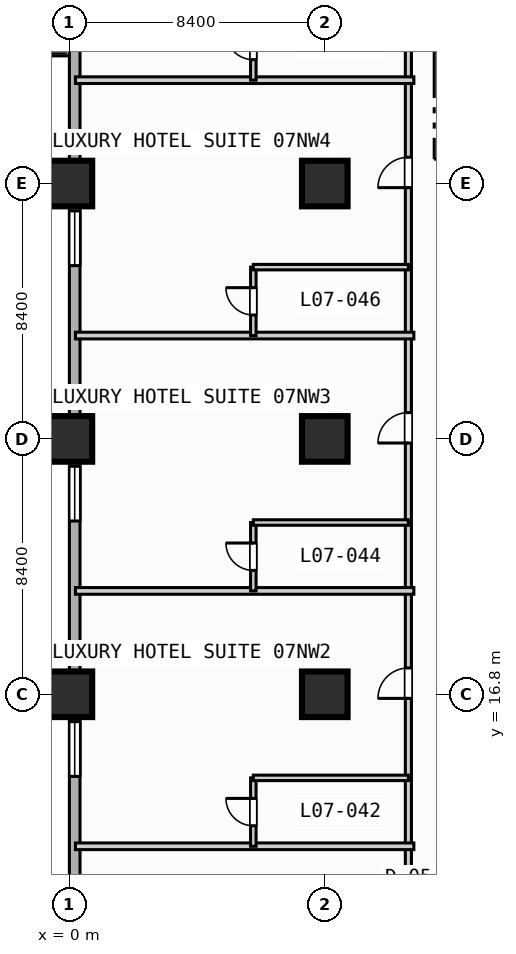
"""IFC4 building model, lengths in metres.
Left out: names, types, materials, properties, quantities, classifications, styles, units other than length and angle.
Written with IfcOpenShell. Run it as: python <this file> out.ifc"""

import sys

from ifc_helpers import new_model, si_unit, direction, frame, frame_2d, origin, origin_2d, place, context, subcontext, project, spatial, rectangle, extrude, element, fill, save


model = new_model("IFC4")
c1 = context("Model", 3, precision=1e-05, world=origin(), true_north=direction((0.0, 1.0)))
c2 = subcontext(c1, "Body", "Model", "MODEL_VIEW")
j1 = project(units=[si_unit("LENGTHUNIT", "METRE"), si_unit("PLANEANGLEUNIT", "RADIAN")], contexts=[c1])
p1 = place(None, origin())
s1 = spatial("IfcSite", under=j1, at=p1, CompositionType="ELEMENT")
p2 = place(p1, origin())
s2 = spatial("IfcBuilding", under=s1, at=p2, CompositionType="ELEMENT")
p3 = place(p2, frame((0.0, 0.0, 35.8)))
s3 = spatial("IfcBuildingStorey", under=s2, at=p3, CompositionType="ELEMENT", Elevation=35.8)
for number, where, z_axis, x_axis in (
    (1, (0.0, 16.8, 0.0), (0.0, 0.0, 1.0), (1.0, 0.0, 0.0)),
    (2, (0.0, 25.2, 0.0), (0.0, 0.0, 1.0), (1.0, 0.0, 0.0)),
    (3, (0.0, 33.6, 0.0), (0.0, 0.0, 1.0), (1.0, 0.0, 0.0)),
    (4, (8.4, 16.8, 0.0), (0.0, 0.0, 1.0), (1.0, 0.0, 0.0)),
    (5, (8.4, 25.2, 0.0), (0.0, 0.0, 1.0), (1.0, 0.0, 0.0)),
    (6, (8.4, 33.6, 0.0), (0.0, 0.0, 1.0), (1.0, 0.0, 0.0)),
):
    element("IfcColumn", number, at=place(p3, frame(where, z_axis=z_axis, x_axis=x_axis)), inside=s3, PredefinedType="COLUMN", context=c2, shape_type="SweptSolid", body=[
        extrude(rectangle(XDim=1.5, YDim=1.5, at=origin_2d()), origin(), (0.0, 0.0, 1.0), 3.8),
    ])
p4 = place(p3, frame((0.175, 3.175, 0.0), z_axis=(0.0, 0.0, 1.0), x_axis=(0.0, 1.0, 0.0)))
e7 = element("IfcWall", 7, at=p4, inside=s3, PredefinedType="STANDARD", context=c2, shape_type="SweptSolid", body=[
    extrude(rectangle(XDim=86.05, YDim=0.35, at=frame_2d((43.025, 0.0))), origin(), (0.0, 0.0, 1.0), 3.55),
])
p5 = place(p4, frame((42.825, 0.0, 0.0)))
e8 = element("IfcOpeningElement", 8, at=p5, cuts=e7, PredefinedType="OPENING", context=c2, shape_type="SweptSolid", body=[
    extrude(rectangle(XDim=1.4, YDim=2.2, at=frame_2d((0.7, 1.1))), frame((0.0, 0.185, 0.0), z_axis=(0.0, -1.0, 0.0), x_axis=(1.0, 0.0, 0.0)), (0.0, 0.0, 1.0), 0.37),
])
p6 = place(p4, frame((2.525, 0.0, 0.85)))
e9 = element("IfcOpeningElement", 9, at=p6, cuts=e7, PredefinedType="OPENING", context=c2, shape_type="SweptSolid", body=[
    extrude(rectangle(XDim=1.8, YDim=1.8, at=frame_2d((0.9, 0.9))), frame((0.0, 0.185, 0.0), z_axis=(0.0, -1.0, 0.0), x_axis=(1.0, 0.0, 0.0)), (0.0, 0.0, 1.0), 0.37),
])
p7 = place(p4, frame((10.925, 0.0, 0.85)))
e10 = element("IfcOpeningElement", 10, at=p7, cuts=e7, PredefinedType="OPENING", context=c2, shape_type="SweptSolid", body=[
    extrude(rectangle(XDim=1.8, YDim=1.8, at=frame_2d((0.9, 0.9))), frame((0.0, 0.185, 0.0), z_axis=(0.0, -1.0, 0.0), x_axis=(1.0, 0.0, 0.0)), (0.0, 0.0, 1.0), 0.37),
])
p8 = place(p4, frame((19.325, 0.0, 0.85)))
e11 = element("IfcOpeningElement", 11, at=p8, cuts=e7, PredefinedType="OPENING", context=c2, shape_type="SweptSolid", body=[
    extrude(rectangle(XDim=1.8, YDim=1.8, at=frame_2d((0.9, 0.9))), frame((0.0, 0.185, 0.0), z_axis=(0.0, -1.0, 0.0), x_axis=(1.0, 0.0, 0.0)), (0.0, 0.0, 1.0), 0.37),
])
p9 = place(p4, frame((27.725, 0.0, 0.85)))
e12 = element("IfcOpeningElement", 12, at=p9, cuts=e7, PredefinedType="OPENING", context=c2, shape_type="SweptSolid", body=[
    extrude(rectangle(XDim=1.8, YDim=1.8, at=frame_2d((0.9, 0.9))), frame((0.0, 0.185, 0.0), z_axis=(0.0, -1.0, 0.0), x_axis=(1.0, 0.0, 0.0)), (0.0, 0.0, 1.0), 0.37),
])
p10 = place(p4, frame((36.125, 0.0, 0.85)))
e13 = element("IfcOpeningElement", 13, at=p10, cuts=e7, PredefinedType="OPENING", context=c2, shape_type="SweptSolid", body=[
    extrude(rectangle(XDim=1.8, YDim=1.8, at=frame_2d((0.9, 0.9))), frame((0.0, 0.185, 0.0), z_axis=(0.0, -1.0, 0.0), x_axis=(1.0, 0.0, 0.0)), (0.0, 0.0, 1.0), 0.37),
])
p11 = place(p4, frame((52.925, 0.0, 0.85)))
e14 = element("IfcOpeningElement", 14, at=p11, cuts=e7, PredefinedType="OPENING", context=c2, shape_type="SweptSolid", body=[
    extrude(rectangle(XDim=1.8, YDim=1.8, at=frame_2d((0.9, 0.9))), frame((0.0, 0.185, 0.0), z_axis=(0.0, -1.0, 0.0), x_axis=(1.0, 0.0, 0.0)), (0.0, 0.0, 1.0), 0.37),
])
p12 = place(p4, frame((61.325, 0.0, 0.85)))
e15 = element("IfcOpeningElement", 15, at=p12, cuts=e7, PredefinedType="OPENING", context=c2, shape_type="SweptSolid", body=[
    extrude(rectangle(XDim=1.8, YDim=1.8, at=frame_2d((0.9, 0.9))), frame((0.0, 0.185, 0.0), z_axis=(0.0, -1.0, 0.0), x_axis=(1.0, 0.0, 0.0)), (0.0, 0.0, 1.0), 0.37),
])
p13 = place(p4, frame((69.725, 0.0, 0.85)))
e16 = element("IfcOpeningElement", 16, at=p13, cuts=e7, PredefinedType="OPENING", context=c2, shape_type="SweptSolid", body=[
    extrude(rectangle(XDim=1.8, YDim=1.8, at=frame_2d((0.9, 0.9))), frame((0.0, 0.185, 0.0), z_axis=(0.0, -1.0, 0.0), x_axis=(1.0, 0.0, 0.0)), (0.0, 0.0, 1.0), 0.37),
])
p14 = place(p4, frame((78.075, 0.0, 0.85)))
e17 = element("IfcOpeningElement", 17, at=p14, cuts=e7, PredefinedType="OPENING", context=c2, shape_type="SweptSolid", body=[
    extrude(rectangle(XDim=1.8, YDim=1.8, at=frame_2d((0.9, 0.9))), frame((0.0, 0.185, 0.0), z_axis=(0.0, -1.0, 0.0), x_axis=(1.0, 0.0, 0.0)), (0.0, 0.0, 1.0), 0.37),
])
p15 = place(p3, frame((11.15, 3.4, 0.0), z_axis=(0.0, 0.0, 1.0), x_axis=(0.0, 1.0, 0.0)))
e18 = element("IfcWall", 18, at=p15, inside=s3, PredefinedType="PARTITIONING", context=c2, shape_type="SweptSolid", body=[
    extrude(rectangle(XDim=85.4, YDim=0.2, at=frame_2d((42.7, 0.0))), origin(), (0.0, 0.0, 1.0), 3.55),
])
p16 = place(p15, frame((4.865, 0.0, 0.0)))
e19 = element("IfcOpeningElement", 19, at=p16, cuts=e18, PredefinedType="OPENING", context=c2, shape_type="SweptSolid", body=[
    extrude(rectangle(XDim=1.0, YDim=2.15, at=frame_2d((0.5, 1.075))), frame((0.0, 0.11, 0.0), z_axis=(0.0, -1.0, 0.0), x_axis=(1.0, 0.0, 0.0)), (0.0, 0.0, 1.0), 0.22),
])
p17 = place(p15, frame((13.265, 0.0, 0.0)))
e20 = element("IfcOpeningElement", 20, at=p17, cuts=e18, PredefinedType="OPENING", context=c2, shape_type="SweptSolid", body=[
    extrude(rectangle(XDim=1.0, YDim=2.15, at=frame_2d((0.5, 1.075))), frame((0.0, 0.11, 0.0), z_axis=(0.0, -1.0, 0.0), x_axis=(1.0, 0.0, 0.0)), (0.0, 0.0, 1.0), 0.22),
])
p18 = place(p15, frame((21.665, 0.0, 0.0)))
e21 = element("IfcOpeningElement", 21, at=p18, cuts=e18, PredefinedType="OPENING", context=c2, shape_type="SweptSolid", body=[
    extrude(rectangle(XDim=1.0, YDim=2.15, at=frame_2d((0.5, 1.075))), frame((0.0, 0.11, 0.0), z_axis=(0.0, -1.0, 0.0), x_axis=(1.0, 0.0, 0.0)), (0.0, 0.0, 1.0), 0.22),
])
p19 = place(p15, frame((30.065, 0.0, 0.0)))
e22 = element("IfcOpeningElement", 22, at=p19, cuts=e18, PredefinedType="OPENING", context=c2, shape_type="SweptSolid", body=[
    extrude(rectangle(XDim=1.0, YDim=2.15, at=frame_2d((0.5, 1.075))), frame((0.0, 0.11, 0.0), z_axis=(0.0, -1.0, 0.0), x_axis=(1.0, 0.0, 0.0)), (0.0, 0.0, 1.0), 0.22),
])
p20 = place(p15, frame((38.465, 0.0, 0.0)))
e23 = element("IfcOpeningElement", 23, at=p20, cuts=e18, PredefinedType="OPENING", context=c2, shape_type="SweptSolid", body=[
    extrude(rectangle(XDim=1.0, YDim=2.15, at=frame_2d((0.5, 1.075))), frame((0.0, 0.11, 0.0), z_axis=(0.0, -1.0, 0.0), x_axis=(1.0, 0.0, 0.0)), (0.0, 0.0, 1.0), 0.22),
])
p21 = place(p15, frame((46.865, 0.0, 0.0)))
e24 = element("IfcOpeningElement", 24, at=p21, cuts=e18, PredefinedType="OPENING", context=c2, shape_type="SweptSolid", body=[
    extrude(rectangle(XDim=1.0, YDim=2.15, at=frame_2d((0.5, 1.075))), frame((0.0, 0.11, 0.0), z_axis=(0.0, -1.0, 0.0), x_axis=(1.0, 0.0, 0.0)), (0.0, 0.0, 1.0), 0.22),
])
p22 = place(p15, frame((55.265, 0.0, 0.0)))
e25 = element("IfcOpeningElement", 25, at=p22, cuts=e18, PredefinedType="OPENING", context=c2, shape_type="SweptSolid", body=[
    extrude(rectangle(XDim=1.0, YDim=2.15, at=frame_2d((0.5, 1.075))), frame((0.0, 0.11, 0.0), z_axis=(0.0, -1.0, 0.0), x_axis=(1.0, 0.0, 0.0)), (0.0, 0.0, 1.0), 0.22),
])
p23 = place(p15, frame((63.665, 0.0, 0.0)))
e26 = element("IfcOpeningElement", 26, at=p23, cuts=e18, PredefinedType="OPENING", context=c2, shape_type="SweptSolid", body=[
    extrude(rectangle(XDim=1.0, YDim=2.15, at=frame_2d((0.5, 1.075))), frame((0.0, 0.11, 0.0), z_axis=(0.0, -1.0, 0.0), x_axis=(1.0, 0.0, 0.0)), (0.0, 0.0, 1.0), 0.22),
])
p24 = place(p15, frame((72.065, 0.0, 0.0)))
e27 = element("IfcOpeningElement", 27, at=p24, cuts=e18, PredefinedType="OPENING", context=c2, shape_type="SweptSolid", body=[
    extrude(rectangle(XDim=1.0, YDim=2.15, at=frame_2d((0.5, 1.075))), frame((0.0, 0.11, 0.0), z_axis=(0.0, -1.0, 0.0), x_axis=(1.0, 0.0, 0.0)), (0.0, 0.0, 1.0), 0.22),
])
p25 = place(p15, frame((81.165, 0.0, 0.0)))
e28 = element("IfcOpeningElement", 28, at=p25, cuts=e18, PredefinedType="OPENING", context=c2, shape_type="SweptSolid", body=[
    extrude(rectangle(XDim=1.0, YDim=2.15, at=frame_2d((0.5, 1.075))), frame((0.0, 0.11, 0.0), z_axis=(0.0, -1.0, 0.0), x_axis=(1.0, 0.0, 0.0)), (0.0, 0.0, 1.0), 0.22),
])
p26 = place(p3, frame((0.2, 11.8, 0.0), z_axis=(0.0, 0.0, 1.0), x_axis=(1.0, 0.0, 0.0)))
e29 = element("IfcWall", 29, at=p26, inside=s3, PredefinedType="PARTITIONING", context=c2, shape_type="SweptSolid", body=[
    extrude(rectangle(XDim=11.13, YDim=0.22, at=frame_2d((5.565, 0.0))), origin(), (0.0, 0.0, 1.0), 3.55),
])
p27 = place(p3, frame((6.05, 11.8, 0.0), z_axis=(0.0, 0.0, 1.0), x_axis=(0.0, 1.0, 0.0)))
e30 = element("IfcWall", 30, at=p27, inside=s3, PredefinedType="PLUMBINGWALL", context=c2, shape_type="SweptSolid", body=[
    extrude(rectangle(XDim=2.25, YDim=0.18, at=frame_2d((1.125, 0.0))), origin(), (0.0, 0.0, 1.0), 3.55),
])
p28 = place(p27, frame((0.675, 0.0, 0.0)))
e31 = element("IfcOpeningElement", 31, at=p28, cuts=e30, PredefinedType="OPENING", context=c2, shape_type="SweptSolid", body=[
    extrude(rectangle(XDim=0.9, YDim=2.1, at=frame_2d((0.45, 1.05))), frame((0.0, 0.1, 0.0), z_axis=(0.0, -1.0, 0.0), x_axis=(1.0, 0.0, 0.0)), (0.0, 0.0, 1.0), 0.2),
])
p29 = place(p3, frame((6.05, 14.05, 0.0), z_axis=(0.0, 0.0, 1.0), x_axis=(1.0, 0.0, 0.0)))
e32 = element("IfcWall", 32, at=p29, inside=s3, PredefinedType="PLUMBINGWALL", context=c2, shape_type="SweptSolid", body=[
    extrude(rectangle(XDim=5.1, YDim=0.18, at=frame_2d((2.55, 0.0))), origin(), (0.0, 0.0, 1.0), 3.55),
])
p30 = place(p3, frame((0.2, 20.2, 0.0), z_axis=(0.0, 0.0, 1.0), x_axis=(1.0, 0.0, 0.0)))
e33 = element("IfcWall", 33, at=p30, inside=s3, PredefinedType="PARTITIONING", context=c2, shape_type="SweptSolid", body=[
    extrude(rectangle(XDim=11.13, YDim=0.22, at=frame_2d((5.565, 0.0))), origin(), (0.0, 0.0, 1.0), 3.55),
])
p31 = place(p3, frame((6.05, 20.2, 0.0), z_axis=(0.0, 0.0, 1.0), x_axis=(0.0, 1.0, 0.0)))
e34 = element("IfcWall", 34, at=p31, inside=s3, PredefinedType="PLUMBINGWALL", context=c2, shape_type="SweptSolid", body=[
    extrude(rectangle(XDim=2.25, YDim=0.18, at=frame_2d((1.125, 0.0))), origin(), (0.0, 0.0, 1.0), 3.55),
])
p32 = place(p31, frame((0.675, 0.0, 0.0)))
e35 = element("IfcOpeningElement", 35, at=p32, cuts=e34, PredefinedType="OPENING", context=c2, shape_type="SweptSolid", body=[
    extrude(rectangle(XDim=0.9, YDim=2.1, at=frame_2d((0.45, 1.05))), frame((0.0, 0.1, 0.0), z_axis=(0.0, -1.0, 0.0), x_axis=(1.0, 0.0, 0.0)), (0.0, 0.0, 1.0), 0.2),
])
p33 = place(p3, frame((6.05, 22.45, 0.0), z_axis=(0.0, 0.0, 1.0), x_axis=(1.0, 0.0, 0.0)))
e36 = element("IfcWall", 36, at=p33, inside=s3, PredefinedType="PLUMBINGWALL", context=c2, shape_type="SweptSolid", body=[
    extrude(rectangle(XDim=5.1, YDim=0.18, at=frame_2d((2.55, 0.0))), origin(), (0.0, 0.0, 1.0), 3.55),
])
p34 = place(p3, frame((0.2, 28.6, 0.0), z_axis=(0.0, 0.0, 1.0), x_axis=(1.0, 0.0, 0.0)))
e37 = element("IfcWall", 37, at=p34, inside=s3, PredefinedType="PARTITIONING", context=c2, shape_type="SweptSolid", body=[
    extrude(rectangle(XDim=11.13, YDim=0.22, at=frame_2d((5.565, 0.0))), origin(), (0.0, 0.0, 1.0), 3.55),
])
p35 = place(p3, frame((6.05, 28.6, 0.0), z_axis=(0.0, 0.0, 1.0), x_axis=(0.0, 1.0, 0.0)))
e38 = element("IfcWall", 38, at=p35, inside=s3, PredefinedType="PLUMBINGWALL", context=c2, shape_type="SweptSolid", body=[
    extrude(rectangle(XDim=2.25, YDim=0.18, at=frame_2d((1.125, 0.0))), origin(), (0.0, 0.0, 1.0), 3.55),
])
p36 = place(p35, frame((0.675, 0.0, 0.0)))
e39 = element("IfcOpeningElement", 39, at=p36, cuts=e38, PredefinedType="OPENING", context=c2, shape_type="SweptSolid", body=[
    extrude(rectangle(XDim=0.9, YDim=2.1, at=frame_2d((0.45, 1.05))), frame((0.0, 0.1, 0.0), z_axis=(0.0, -1.0, 0.0), x_axis=(1.0, 0.0, 0.0)), (0.0, 0.0, 1.0), 0.2),
])
p37 = place(p3, frame((6.05, 30.85, 0.0), z_axis=(0.0, 0.0, 1.0), x_axis=(1.0, 0.0, 0.0)))
e40 = element("IfcWall", 40, at=p37, inside=s3, PredefinedType="PLUMBINGWALL", context=c2, shape_type="SweptSolid", body=[
    extrude(rectangle(XDim=5.1, YDim=0.18, at=frame_2d((2.55, 0.0))), origin(), (0.0, 0.0, 1.0), 3.55),
])
p38 = place(p3, frame((0.2, 37.0, 0.0), z_axis=(0.0, 0.0, 1.0), x_axis=(1.0, 0.0, 0.0)))
e41 = element("IfcWall", 41, at=p38, inside=s3, PredefinedType="PARTITIONING", context=c2, shape_type="SweptSolid", body=[
    extrude(rectangle(XDim=11.13, YDim=0.22, at=frame_2d((5.565, 0.0))), origin(), (0.0, 0.0, 1.0), 3.55),
])
p39 = place(p3, frame((6.05, 37.0, 0.0), z_axis=(0.0, 0.0, 1.0), x_axis=(0.0, 1.0, 0.0)))
e42 = element("IfcWall", 42, at=p39, inside=s3, PredefinedType="PLUMBINGWALL", context=c2, shape_type="SweptSolid", body=[
    extrude(rectangle(XDim=2.25, YDim=0.18, at=frame_2d((1.125, 0.0))), origin(), (0.0, 0.0, 1.0), 3.55),
])
p40 = place(p39, frame((0.675, 0.0, 0.0)))
e43 = element("IfcOpeningElement", 43, at=p40, cuts=e42, PredefinedType="OPENING", context=c2, shape_type="SweptSolid", body=[
    extrude(rectangle(XDim=0.9, YDim=2.1, at=frame_2d((0.45, 1.05))), frame((0.0, 0.1, 0.0), z_axis=(0.0, -1.0, 0.0), x_axis=(1.0, 0.0, 0.0)), (0.0, 0.0, 1.0), 0.2),
])
p41 = place(p7, origin())
e44 = element("IfcWindow", 44, at=p41, inside=s3, PartitioningType="SINGLE_PANEL", PredefinedType="WINDOW", context=c2, shape_type="SweptSolid", body=[
    extrude(rectangle(XDim=1.8, YDim=1.8, at=frame_2d((0.9, 0.9))), frame((0.0, 0.03, 0.0), z_axis=(0.0, -1.0, 0.0), x_axis=(1.0, 0.0, 0.0)), (0.0, 0.0, 1.0), 0.06),
])
fill(e10, e44)
p42 = place(p8, origin())
e45 = element("IfcWindow", 45, at=p42, inside=s3, PartitioningType="SINGLE_PANEL", PredefinedType="WINDOW", context=c2, shape_type="SweptSolid", body=[
    extrude(rectangle(XDim=1.8, YDim=1.8, at=frame_2d((0.9, 0.9))), frame((0.0, 0.03, 0.0), z_axis=(0.0, -1.0, 0.0), x_axis=(1.0, 0.0, 0.0)), (0.0, 0.0, 1.0), 0.06),
])
fill(e11, e45)
p43 = place(p9, origin())
e46 = element("IfcWindow", 46, at=p43, inside=s3, PartitioningType="SINGLE_PANEL", PredefinedType="WINDOW", context=c2, shape_type="SweptSolid", body=[
    extrude(rectangle(XDim=1.8, YDim=1.8, at=frame_2d((0.9, 0.9))), frame((0.0, 0.03, 0.0), z_axis=(0.0, -1.0, 0.0), x_axis=(1.0, 0.0, 0.0)), (0.0, 0.0, 1.0), 0.06),
])
fill(e12, e46)
p44 = place(p17, origin())
e47 = element("IfcDoor", 47, at=p44, inside=s3, OperationType="SINGLE_SWING_LEFT", PredefinedType="DOOR", context=c2, shape_type="SweptSolid", body=[
    extrude(rectangle(XDim=1.0, YDim=2.15, at=frame_2d((0.5, 1.075))), frame((0.0, 0.025, 0.0), z_axis=(0.0, -1.0, 0.0), x_axis=(1.0, 0.0, 0.0)), (0.0, 0.0, 1.0), 0.05),
])
fill(e20, e47)
p45 = place(p18, origin())
e48 = element("IfcDoor", 48, at=p45, inside=s3, OperationType="SINGLE_SWING_LEFT", PredefinedType="DOOR", context=c2, shape_type="SweptSolid", body=[
    extrude(rectangle(XDim=1.0, YDim=2.15, at=frame_2d((0.5, 1.075))), frame((0.0, 0.025, 0.0), z_axis=(0.0, -1.0, 0.0), x_axis=(1.0, 0.0, 0.0)), (0.0, 0.0, 1.0), 0.05),
])
fill(e21, e48)
p46 = place(p19, origin())
e49 = element("IfcDoor", 49, at=p46, inside=s3, OperationType="SINGLE_SWING_LEFT", PredefinedType="DOOR", context=c2, shape_type="SweptSolid", body=[
    extrude(rectangle(XDim=1.0, YDim=2.15, at=frame_2d((0.5, 1.075))), frame((0.0, 0.025, 0.0), z_axis=(0.0, -1.0, 0.0), x_axis=(1.0, 0.0, 0.0)), (0.0, 0.0, 1.0), 0.05),
])
fill(e22, e49)
p47 = place(p28, origin())
e50 = element("IfcDoor", 50, at=p47, inside=s3, OperationType="SINGLE_SWING_RIGHT", PredefinedType="DOOR", context=c2, shape_type="SweptSolid", body=[
    extrude(rectangle(XDim=0.9, YDim=2.1, at=frame_2d((0.45, 1.05))), frame((0.0, 0.025, 0.0), z_axis=(0.0, -1.0, 0.0), x_axis=(1.0, 0.0, 0.0)), (0.0, 0.0, 1.0), 0.05),
])
fill(e31, e50)
p48 = place(p32, origin())
e51 = element("IfcDoor", 51, at=p48, inside=s3, OperationType="SINGLE_SWING_RIGHT", PredefinedType="DOOR", context=c2, shape_type="SweptSolid", body=[
    extrude(rectangle(XDim=0.9, YDim=2.1, at=frame_2d((0.45, 1.05))), frame((0.0, 0.025, 0.0), z_axis=(0.0, -1.0, 0.0), x_axis=(1.0, 0.0, 0.0)), (0.0, 0.0, 1.0), 0.05),
])
fill(e35, e51)
p49 = place(p36, origin())
e52 = element("IfcDoor", 52, at=p49, inside=s3, OperationType="SINGLE_SWING_RIGHT", PredefinedType="DOOR", context=c2, shape_type="SweptSolid", body=[
    extrude(rectangle(XDim=0.9, YDim=2.1, at=frame_2d((0.45, 1.05))), frame((0.0, 0.025, 0.0), z_axis=(0.0, -1.0, 0.0), x_axis=(1.0, 0.0, 0.0)), (0.0, 0.0, 1.0), 0.05),
])
fill(e39, e52)
p50 = place(p40, origin())
e53 = element("IfcDoor", 53, at=p50, inside=s3, OperationType="SINGLE_SWING_RIGHT", PredefinedType="DOOR", context=c2, shape_type="SweptSolid", body=[
    extrude(rectangle(XDim=0.9, YDim=2.1, at=frame_2d((0.45, 1.05))), frame((0.0, 0.025, 0.0), z_axis=(0.0, -1.0, 0.0), x_axis=(1.0, 0.0, 0.0)), (0.0, 0.0, 1.0), 0.05),
])
fill(e43, e53)
save(model, sys.argv[1])
